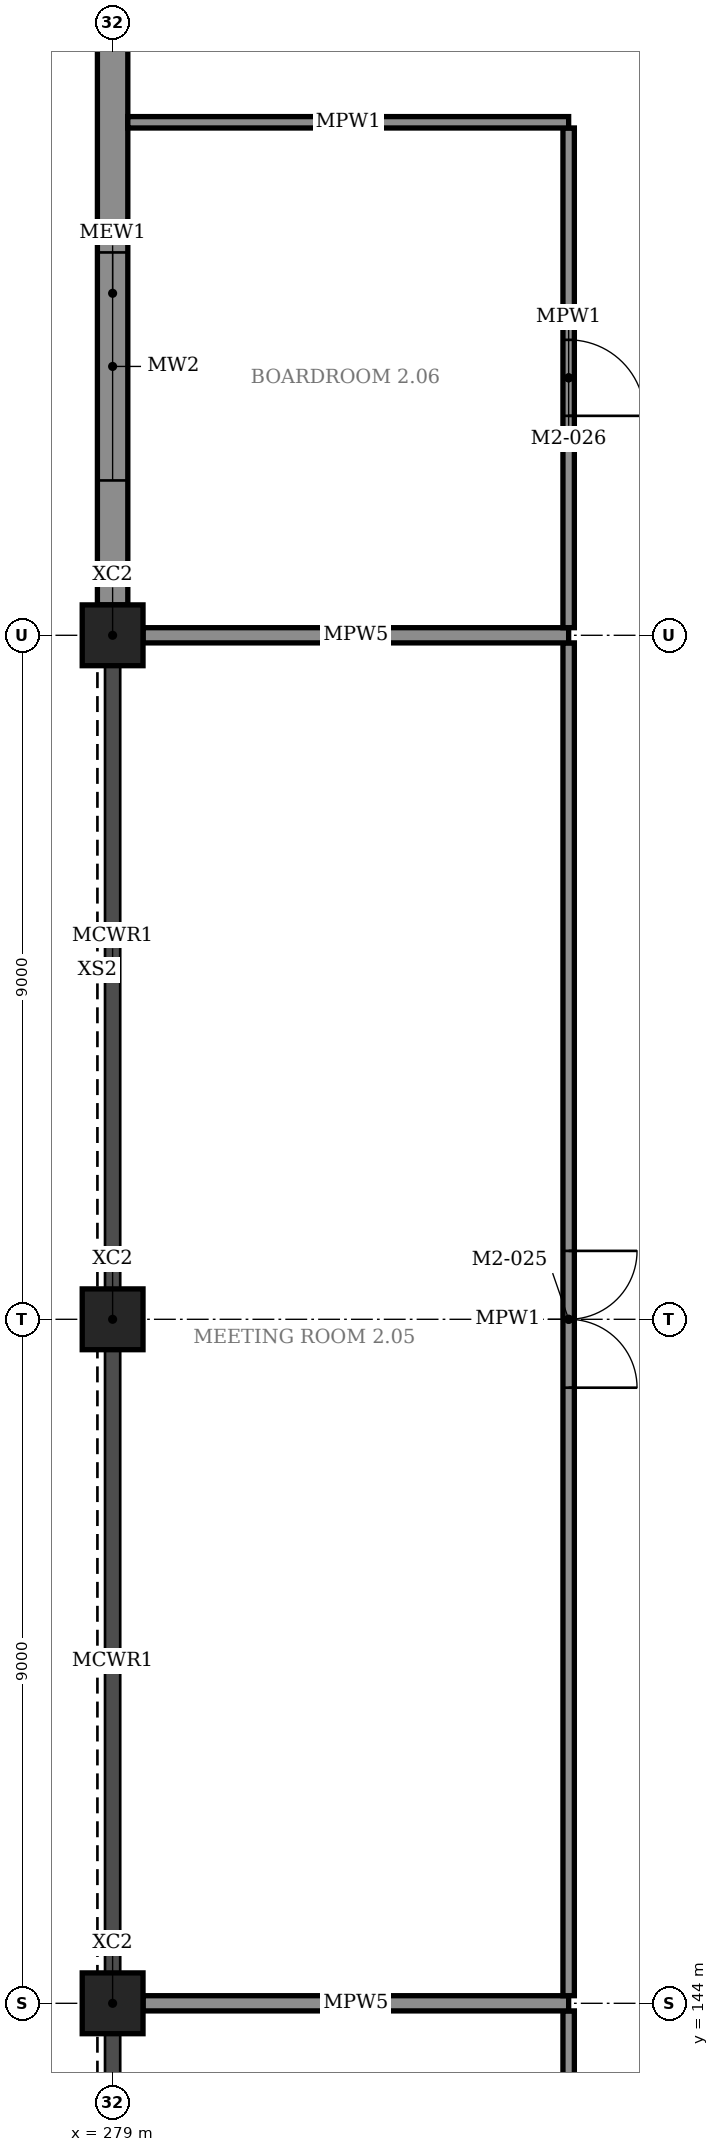
"""IFC4 building model, lengths in metres.
Left out: names, types, materials, properties, quantities, classifications, styles, units other than length and angle.
Written with IfcOpenShell. Run it as: python <this file> out.ifc"""

import sys

from ifc_helpers import new_model, si_unit, direction, frame, frame_2d, origin, origin_2d, place, context, subcontext, project, spatial, rectangle, extrude, element, fill, save


model = new_model("IFC4")
c1 = context("Model", 3, precision=1e-05, world=origin(), true_north=direction((0.0, 1.0)))
c2 = subcontext(c1, "Body", "Model", "MODEL_VIEW")
j1 = project(units=[si_unit("LENGTHUNIT", "METRE"), si_unit("PLANEANGLEUNIT", "RADIAN")], contexts=[c1])
p1 = place(None, origin())
s1 = spatial("IfcSite", under=j1, at=p1, CompositionType="ELEMENT")
p2 = place(p1, origin())
s2 = spatial("IfcBuilding", under=s1, at=p2, CompositionType="ELEMENT")
p3 = place(p2, frame((0.0, 0.0, 11.5)))
s3 = spatial("IfcBuildingStorey", under=s2, at=p3, CompositionType="ELEMENT", Elevation=11.5)
for number, where, z_axis, x_axis in (
    (1, (279.0, 144.0, 0.0), (0.0, 0.0, 1.0), (1.0, 0.0, 0.0)),
    (2, (279.0, 153.0, 0.0), (0.0, 0.0, 1.0), (1.0, 0.0, 0.0)),
    (3, (279.0, 162.0, 0.0), (0.0, 0.0, 1.0), (1.0, 0.0, 0.0)),
):
    element("IfcColumn", number, at=place(p3, frame(where, z_axis=z_axis, x_axis=x_axis)), inside=s3, PredefinedType="COLUMN", context=c2, shape_type="SweptSolid", body=[
        extrude(rectangle(XDim=0.8, YDim=0.8, at=origin_2d()), origin(), (0.0, 0.0, 1.0), 5.5),
    ])
p4 = place(p3, frame((279.0, 162.4, 0.0), z_axis=(0.0, 0.0, 1.0), x_axis=(0.0, 1.0, 0.0)))
e4 = element("IfcWall", 4, at=p4, inside=s3, PredefinedType="STANDARD", context=c2, shape_type="SweptSolid", body=[
    extrude(rectangle(XDim=8.2, YDim=0.4, at=frame_2d((4.1, 0.0))), origin(), (0.0, 0.0, 1.0), 4.32),
])
p5 = place(p4, frame((1.638, 0.0, 0.9)))
e5 = element("IfcOpeningElement", 5, at=p5, cuts=e4, PredefinedType="OPENING", context=c2, shape_type="SweptSolid", body=[
    extrude(rectangle(XDim=3.0, YDim=2.1, at=frame_2d((1.5, 1.05))), frame((0.0, 0.21, 0.0), z_axis=(0.0, -1.0, 0.0), x_axis=(1.0, 0.0, 0.0)), (0.0, 0.0, 1.0), 0.42),
])
p6 = place(p3, frame((279.4, 144.0, 0.0), z_axis=(0.0, 0.0, 1.0), x_axis=(1.0, 0.0, 0.0)))
e6 = element("IfcWall", 6, at=p6, inside=s3, PredefinedType="PARTITIONING", context=c2, shape_type="SweptSolid", body=[
    extrude(rectangle(XDim=5.6, YDim=0.2, at=frame_2d((2.8, 0.0))), origin(), (0.0, 0.0, 1.0), 4.32),
])
p7 = place(p3, frame((285.0, 135.1, 0.0), z_axis=(0.0, 0.0, 1.0), x_axis=(0.0, 1.0, 0.0)))
e7 = element("IfcWall", 7, at=p7, inside=s3, PredefinedType="PARTITIONING", context=c2, shape_type="SweptSolid", body=[
    extrude(rectangle(XDim=8.8, YDim=0.15, at=frame_2d((4.4, 0.0))), origin(), (0.0, 0.0, 1.0), 4.32),
])
p8 = place(p7, frame((3.9, 0.0, 0.0)))
e8 = element("IfcOpeningElement", 8, at=p8, cuts=e7, PredefinedType="OPENING", context=c2, shape_type="SweptSolid", body=[
    extrude(rectangle(XDim=1.0, YDim=2.4, at=frame_2d((0.5, 1.2))), frame((0.0, 0.085, 0.0), z_axis=(0.0, -1.0, 0.0), x_axis=(1.0, 0.0, 0.0)), (0.0, 0.0, 1.0), 0.17),
])
p9 = place(p3, frame((279.4, 162.0, 0.0), z_axis=(0.0, 0.0, 1.0), x_axis=(1.0, 0.0, 0.0)))
e9 = element("IfcWall", 9, at=p9, inside=s3, PredefinedType="PARTITIONING", context=c2, shape_type="SweptSolid", body=[
    extrude(rectangle(XDim=5.6, YDim=0.2, at=frame_2d((2.8, 0.0))), origin(), (0.0, 0.0, 1.0), 4.32),
])
p10 = place(p3, frame((285.0, 144.1, 0.0), z_axis=(0.0, 0.0, 1.0), x_axis=(0.0, 1.0, 0.0)))
e10 = element("IfcWall", 10, at=p10, inside=s3, PredefinedType="PARTITIONING", context=c2, shape_type="SweptSolid", body=[
    extrude(rectangle(XDim=17.8, YDim=0.15, at=frame_2d((8.9, 0.0))), origin(), (0.0, 0.0, 1.0), 4.32),
])
p11 = place(p10, frame((8.0, 0.0, 0.0)))
e11 = element("IfcOpeningElement", 11, at=p11, cuts=e10, PredefinedType="OPENING", context=c2, shape_type="SweptSolid", body=[
    extrude(rectangle(XDim=1.8, YDim=2.4, at=frame_2d((0.9, 1.2))), frame((0.0, 0.085, 0.0), z_axis=(0.0, -1.0, 0.0), x_axis=(1.0, 0.0, 0.0)), (0.0, 0.0, 1.0), 0.17),
])
p12 = place(p3, frame((279.2, 168.75, 0.0), z_axis=(0.0, 0.0, 1.0), x_axis=(1.0, 0.0, 0.0)))
e12 = element("IfcWall", 12, at=p12, inside=s3, PredefinedType="PARTITIONING", context=c2, shape_type="SweptSolid", body=[
    extrude(rectangle(XDim=5.8, YDim=0.15, at=frame_2d((2.9, 0.0))), origin(), (0.0, 0.0, 1.0), 4.32),
])
p13 = place(p3, frame((285.0, 162.1, 0.0), z_axis=(0.0, 0.0, 1.0), x_axis=(0.0, 1.0, 0.0)))
e13 = element("IfcWall", 13, at=p13, inside=s3, PredefinedType="PARTITIONING", context=c2, shape_type="SweptSolid", body=[
    extrude(rectangle(XDim=6.575, YDim=0.15, at=frame_2d((3.288, 0.0))), origin(), (0.0, 0.0, 1.0), 4.32),
])
p14 = place(p13, frame((2.787, 0.0, 0.0)))
e14 = element("IfcOpeningElement", 14, at=p14, cuts=e13, PredefinedType="OPENING", context=c2, shape_type="SweptSolid", body=[
    extrude(rectangle(XDim=1.0, YDim=2.4, at=frame_2d((0.5, 1.2))), frame((0.0, 0.085, 0.0), z_axis=(0.0, -1.0, 0.0), x_axis=(1.0, 0.0, 0.0)), (0.0, 0.0, 1.0), 0.17),
])
p15 = place(p5, origin())
e15 = element("IfcWindow", 15, at=p15, inside=s3, PartitioningType="TRIPLE_PANEL_VERTICAL", PredefinedType="WINDOW", context=c2, shape_type="SweptSolid", body=[
    extrude(rectangle(XDim=3.0, YDim=2.1, at=frame_2d((1.5, 1.05))), frame((0.0, 0.03, 0.0), z_axis=(0.0, -1.0, 0.0), x_axis=(1.0, 0.0, 0.0)), (0.0, 0.0, 1.0), 0.06),
])
fill(e5, e15)
p16 = place(p11, frame((1.8, 0.0, 0.0), z_axis=(0.0, 0.0, 1.0), x_axis=(-1.0, 0.0, 0.0)))
e16 = element("IfcDoor", 16, at=p16, inside=s3, OperationType="DOUBLE_DOOR_SINGLE_SWING", PredefinedType="DOOR", context=c2, shape_type="SweptSolid", body=[
    extrude(rectangle(XDim=1.8, YDim=2.4, at=frame_2d((0.9, 1.2))), frame((0.0, 0.025, 0.0), z_axis=(0.0, -1.0, 0.0), x_axis=(1.0, 0.0, 0.0)), (0.0, 0.0, 1.0), 0.05),
])
fill(e11, e16)
p17 = place(p14, frame((1.0, 0.0, 0.0), z_axis=(0.0, 0.0, 1.0), x_axis=(-1.0, 0.0, 0.0)))
e17 = element("IfcDoor", 17, at=p17, inside=s3, OperationType="SINGLE_SWING_LEFT", PredefinedType="DOOR", context=c2, shape_type="SweptSolid", body=[
    extrude(rectangle(XDim=1.0, YDim=2.4, at=frame_2d((0.5, 1.2))), frame((0.0, 0.025, 0.0), z_axis=(0.0, -1.0, 0.0), x_axis=(1.0, 0.0, 0.0)), (0.0, 0.0, 1.0), 0.05),
])
fill(e14, e17)
save(model, sys.argv[1])
